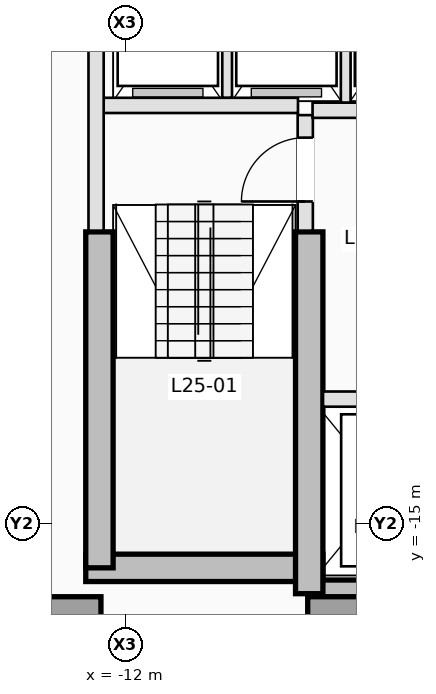
"""IFC4 building model, lengths in metres.
Left out: names, types, materials, properties, quantities, classifications, styles, units other than length and angle.
Written with IfcOpenShell. Run it as: python <this file> out.ifc"""

import sys

from ifc_helpers import new_model, si_unit, direction, frame, frame_2d, origin, origin_2d, place, context, subcontext, project, spatial, rectangle, extrude, element, fill, save


model = new_model("IFC4")
c1 = context("Model", 3, precision=1e-05, world=origin(), true_north=direction((0.0, 1.0)))
c2 = subcontext(c1, "Body", "Model", "MODEL_VIEW")
j1 = project(units=[si_unit("LENGTHUNIT", "METRE"), si_unit("PLANEANGLEUNIT", "RADIAN")], contexts=[c1])
p1 = place(None, origin())
s1 = spatial("IfcSite", under=j1, at=p1, CompositionType="ELEMENT")
p2 = place(p1, origin())
s2 = spatial("IfcBuilding", under=s1, at=p2, CompositionType="ELEMENT")
p3 = place(p2, frame((0.0, 0.0, 95.0)))
s3 = spatial("IfcBuildingStorey", under=s2, at=p3, CompositionType="ELEMENT", Elevation=95.0)
p4 = place(p3, frame((-12.65, -15.725, 0.0), z_axis=(0.0, 0.0, 1.0), x_axis=(1.0, 0.0, 0.0)))
e1 = element("IfcWall", 1, at=p4, inside=s3, PredefinedType="SHEAR", context=c2, shape_type="SweptSolid", body=[
    extrude(rectangle(XDim=3.9, YDim=0.45, at=frame_2d((1.95, 0.0))), origin(), (0.0, 0.0, 1.0), 3.5),
])
p5 = place(p3, frame((-8.975, -16.15, 0.0), z_axis=(0.0, 0.0, 1.0), x_axis=(1.0, 0.0, 0.0)))
e2 = element("IfcWall", 2, at=p5, inside=s3, PredefinedType="SHEAR", context=c2, shape_type="SweptSolid", body=[
    extrude(rectangle(XDim=5.225, YDim=0.45, at=frame_2d((2.613, 0.0))), origin(), (0.0, 0.0, 1.0), 3.5),
])
p6 = place(p3, frame((-12.425, -15.725, 0.0), z_axis=(0.0, 0.0, 1.0), x_axis=(0.0, 1.0, 0.0)))
e3 = element("IfcWall", 3, at=p6, inside=s3, PredefinedType="SHEAR", context=c2, shape_type="SweptSolid", body=[
    extrude(rectangle(XDim=5.525, YDim=0.45, at=frame_2d((2.763, 0.0))), origin(), (0.0, 0.0, 1.0), 3.5),
])
p7 = place(p3, frame((-8.975, -16.15, 0.0), z_axis=(0.0, 0.0, 1.0), x_axis=(0.0, 1.0, 0.0)))
e4 = element("IfcWall", 4, at=p7, inside=s3, PredefinedType="SHEAR", context=c2, shape_type="SweptSolid", body=[
    extrude(rectangle(XDim=5.95, YDim=0.45, at=frame_2d((2.975, 0.0))), origin(), (0.0, 0.0, 1.0), 3.5),
])
for number, where, z_axis, x_axis in (
    (5, (-12.95, -16.75, 0.0), (0.0, 0.0, 1.0), (1.0, 0.0, 0.0)),
    (6, (-8.45, -16.75, 0.0), (0.0, 0.0, 1.0), (1.0, 0.0, 0.0)),
):
    element("IfcColumn", number, at=place(p3, frame(where, z_axis=z_axis, x_axis=x_axis)), inside=s3, PredefinedType="COLUMN", context=c2, shape_type="SweptSolid", body=[
        extrude(rectangle(XDim=1.1, YDim=1.1, at=origin_2d()), origin(), (0.0, 0.0, 1.0), 3.5),
    ])
p8 = place(p3, frame((-9.04, -10.18, 0.0), z_axis=(0.0, 0.0, 1.0), x_axis=(0.0, 1.0, 0.0)))
e7 = element("IfcWall", 7, at=p8, inside=s3, PredefinedType="PARTITIONING", context=c2, shape_type="SweptSolid", body=[
    extrude(rectangle(XDim=1.9, YDim=0.25, at=frame_2d((0.95, 0.0))), origin(), (0.0, 0.0, 1.0), 3.25),
])
p9 = place(p8, frame((0.48, 0.0, 0.0)))
e8 = element("IfcOpeningElement", 8, at=p9, cuts=e7, PredefinedType="OPENING", context=c2, shape_type="SweptSolid", body=[
    extrude(rectangle(XDim=1.05, YDim=2.15, at=frame_2d((0.525, 1.075))), frame((0.0, 0.135, 0.0), z_axis=(0.0, -1.0, 0.0), x_axis=(1.0, 0.0, 0.0)), (0.0, 0.0, 1.0), 0.27),
])
p10 = place(p3, frame((-12.38, -8.12, 0.0), z_axis=(0.0, 0.0, 1.0), x_axis=(1.0, 0.0, 0.0)))
e9 = element("IfcWall", 9, at=p10, inside=s3, PredefinedType="PARTITIONING", context=c2, shape_type="SweptSolid", body=[
    extrude(rectangle(XDim=3.22, YDim=0.25, at=frame_2d((1.61, 0.0))), origin(), (0.0, 0.0, 1.0), 3.25),
])
p11 = place(p3, frame((-12.48, -10.18, 0.0), z_axis=(0.0, 0.0, 1.0), x_axis=(0.0, 1.0, 0.0)))
e10 = element("IfcWall", 10, at=p11, inside=s3, PredefinedType="PARTITIONING", context=c2, shape_type="SweptSolid", body=[
    extrude(rectangle(XDim=4.828, YDim=0.25, at=frame_2d((2.414, 0.0))), origin(), (0.0, 0.0, 1.0), 3.25),
])
p12 = place(p3, frame((-8.748, -12.95, 0.0), z_axis=(0.0, 0.0, 1.0), x_axis=(1.0, 0.0, 0.0)))
e11 = element("IfcWall", 11, at=p12, inside=s3, PredefinedType="PARTITIONING", context=c2, shape_type="SweptSolid", body=[
    extrude(rectangle(XDim=5.068, YDim=0.25, at=frame_2d((2.534, 0.0))), origin(), (0.0, 0.0, 1.0), 3.25),
])
p13 = place(p12, frame((0.648, 0.0, 0.0)))
e12 = element("IfcOpeningElement", 12, at=p13, cuts=e11, PredefinedType="OPENING", context=c2, shape_type="SweptSolid", body=[
    extrude(rectangle(XDim=1.1, YDim=2.15, at=frame_2d((0.55, 1.075))), frame((0.0, 0.135, 0.0), z_axis=(0.0, -1.0, 0.0), x_axis=(1.0, 0.0, 0.0)), (0.0, 0.0, 1.0), 0.27),
])
p14 = place(p12, frame((2.548, 0.0, 0.0)))
e13 = element("IfcOpeningElement", 13, at=p14, cuts=e11, PredefinedType="OPENING", context=c2, shape_type="SweptSolid", body=[
    extrude(rectangle(XDim=0.88, YDim=2.1, at=frame_2d((0.44, 1.05))), frame((0.0, 0.135, 0.0), z_axis=(0.0, -1.0, 0.0), x_axis=(1.0, 0.0, 0.0)), (0.0, 0.0, 1.0), 0.27),
])
p15 = place(p12, frame((3.948, 0.0, 0.0)))
e14 = element("IfcOpeningElement", 14, at=p15, cuts=e11, PredefinedType="OPENING", context=c2, shape_type="SweptSolid", body=[
    extrude(rectangle(XDim=0.88, YDim=2.1, at=frame_2d((0.44, 1.05))), frame((0.0, 0.135, 0.0), z_axis=(0.0, -1.0, 0.0), x_axis=(1.0, 0.0, 0.0)), (0.0, 0.0, 1.0), 0.27),
])
p16 = place(p3, frame((-8.92, -8.2, 0.0), z_axis=(0.0, 0.0, 1.0), x_axis=(1.0, 0.0, 0.0)))
e15 = element("IfcWall", 15, at=p16, inside=s3, PredefinedType="PARTITIONING", context=c2, shape_type="SweptSolid", body=[
    extrude(rectangle(XDim=5.24, YDim=0.25, at=frame_2d((2.62, 0.0))), origin(), (0.0, 0.0, 1.0), 3.25),
])
p17 = place(p3, frame((-10.325, -7.993, 0.0), z_axis=(0.0, 0.0, 1.0), x_axis=(0.0, 1.0, 0.0)))
e16 = element("IfcWall", 16, at=p17, inside=s3, PredefinedType="PARTITIONING", context=c2, shape_type="SweptSolid", body=[
    extrude(rectangle(XDim=2.653, YDim=0.16, at=frame_2d((1.326, 0.0))), origin(), (0.0, 0.0, 1.0), 3.25),
])
p18 = place(p3, frame((-8.375, -8.073, 0.0), z_axis=(0.0, 0.0, 1.0), x_axis=(0.0, 1.0, 0.0)))
e17 = element("IfcWall", 17, at=p18, inside=s3, PredefinedType="PARTITIONING", context=c2, shape_type="SweptSolid", body=[
    extrude(rectangle(XDim=2.733, YDim=0.16, at=frame_2d((1.366, 0.0))), origin(), (0.0, 0.0, 1.0), 3.25),
])
p19 = place(p9, origin())
e18 = element("IfcDoor", 18, at=p19, inside=s3, OperationType="SINGLE_SWING_LEFT", PredefinedType="DOOR", context=c2, shape_type="SweptSolid", body=[
    extrude(rectangle(XDim=1.05, YDim=2.15, at=frame_2d((0.525, 1.075))), frame((0.0, 0.025, 0.0), z_axis=(0.0, -1.0, 0.0), x_axis=(1.0, 0.0, 0.0)), (0.0, 0.0, 1.0), 0.05),
])
fill(e8, e18)
save(model, sys.argv[1])
